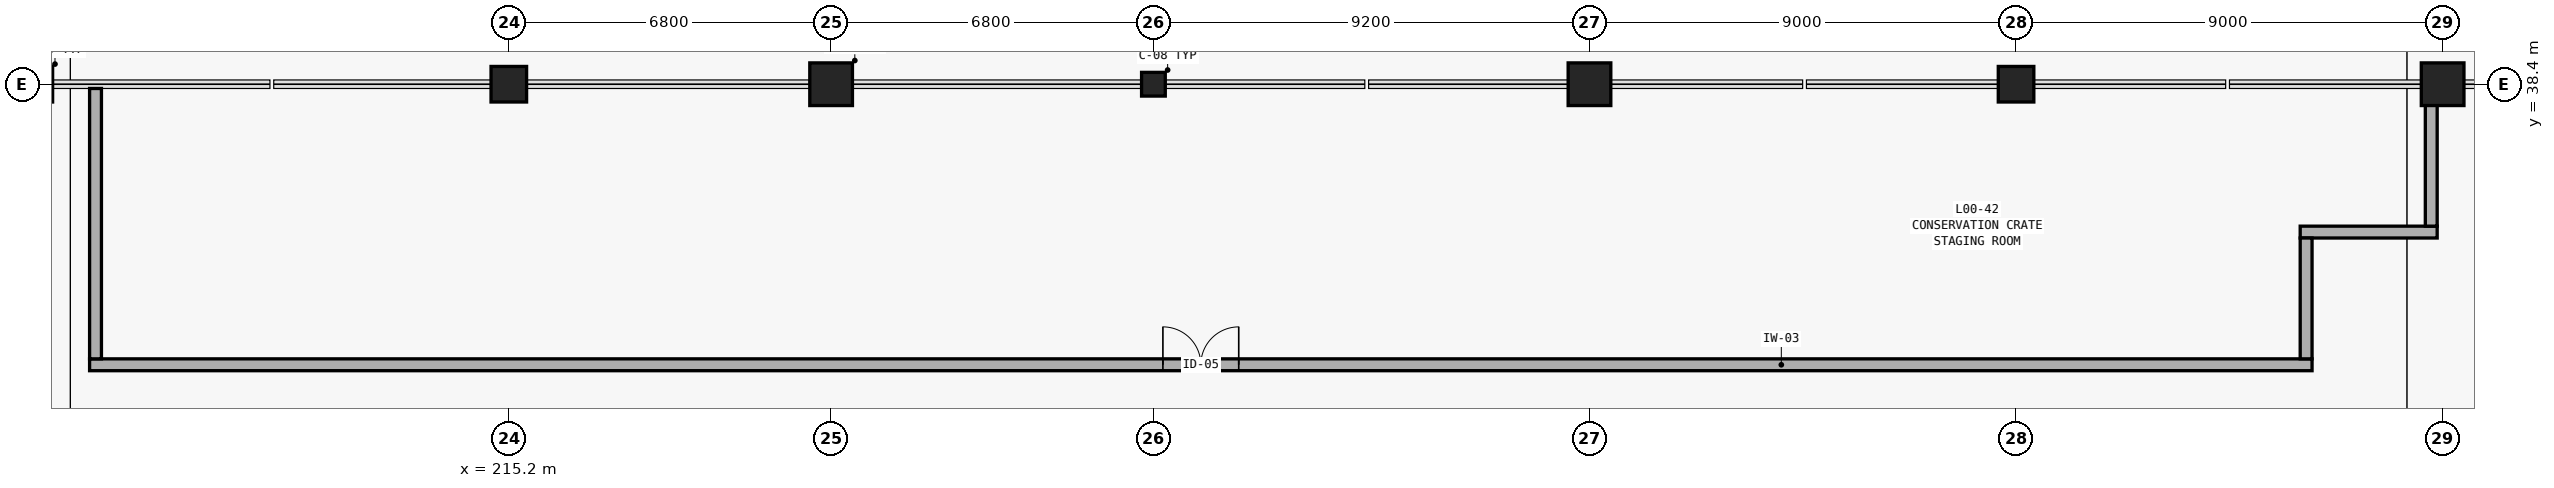
"""IFC4 building model, lengths in metres.
Left out: names, types, materials, properties, quantities, classifications, styles, units other than length and angle.
Written with IfcOpenShell. Run it as: python <this file> out.ifc"""

import sys

from ifc_helpers import new_model, si_unit, direction, frame, frame_2d, origin, origin_2d, place, context, subcontext, project, spatial, rectangle, extrude, element, fill, save


model = new_model("IFC4")
c1 = context("Model", 3, precision=1e-05, world=origin(), true_north=direction((0.0, 1.0)))
c2 = subcontext(c1, "Body", "Model", "MODEL_VIEW")
j1 = project(units=[si_unit("LENGTHUNIT", "METRE"), si_unit("PLANEANGLEUNIT", "RADIAN")], contexts=[c1])
p1 = place(None, origin())
s1 = spatial("IfcSite", under=j1, at=p1, CompositionType="ELEMENT")
p2 = place(p1, origin())
s2 = spatial("IfcBuilding", under=s1, at=p2, CompositionType="ELEMENT")
p3 = place(p2, origin())
s3 = spatial("IfcBuildingStorey", under=s2, at=p3, CompositionType="ELEMENT", Elevation=0.0)
for number, where, z_axis, x_axis in (
    (1, (205.2, 38.4, 0.0), (0.0, 0.0, 1.0), (1.0, 0.0, 0.0)),
    (2, (215.2, 38.4, 0.0), (0.0, 0.0, 1.0), (1.0, 0.0, 0.0)),
):
    element("IfcColumn", number, at=place(p3, frame(where, z_axis=z_axis, x_axis=x_axis)), inside=s3, PredefinedType="COLUMN", context=c2, shape_type="SweptSolid", body=[
        extrude(rectangle(XDim=0.75, YDim=0.75, at=origin_2d()), origin(), (0.0, 0.0, 1.0), 4.8),
    ])
p4 = place(p3, frame((222.0, 38.4, 0.0), z_axis=(0.0, 0.0, 1.0), x_axis=(1.0, 0.0, 0.0)))
e3 = element("IfcColumn", 3, at=p4, inside=s3, PredefinedType="COLUMN", context=c2, shape_type="SweptSolid", body=[
    extrude(rectangle(XDim=0.9, YDim=0.9, at=origin_2d()), origin(), (0.0, 0.0, 1.0), 4.8),
])
p5 = place(p3, frame((228.8, 38.4, 0.0), z_axis=(0.0, 0.0, 1.0), x_axis=(1.0, 0.0, 0.0)))
e4 = element("IfcColumn", 4, at=p5, inside=s3, PredefinedType="COLUMN", context=c2, shape_type="SweptSolid", body=[
    extrude(rectangle(XDim=0.5, YDim=0.5, at=origin_2d()), origin(), (0.0, 0.0, 1.0), 4.8),
])
p6 = place(p3, frame((238.0, 38.4, 0.0), z_axis=(0.0, 0.0, 1.0), x_axis=(1.0, 0.0, 0.0)))
e5 = element("IfcColumn", 5, at=p6, inside=s3, PredefinedType="COLUMN", context=c2, shape_type="SweptSolid", body=[
    extrude(rectangle(XDim=0.9, YDim=0.9, at=origin_2d()), origin(), (0.0, 0.0, 1.0), 4.8),
])
p7 = place(p3, frame((247.0, 38.4, 0.0), z_axis=(0.0, 0.0, 1.0), x_axis=(1.0, 0.0, 0.0)))
e6 = element("IfcColumn", 6, at=p7, inside=s3, PredefinedType="COLUMN", context=c2, shape_type="SweptSolid", body=[
    extrude(rectangle(XDim=0.75, YDim=0.75, at=origin_2d()), origin(), (0.0, 0.0, 1.0), 4.8),
])
p8 = place(p3, frame((256.0, 38.4, 0.0), z_axis=(0.0, 0.0, 1.0), x_axis=(1.0, 0.0, 0.0)))
e7 = element("IfcColumn", 7, at=p8, inside=s3, PredefinedType="COLUMN", context=c2, shape_type="SweptSolid", body=[
    extrude(rectangle(XDim=0.9, YDim=0.9, at=origin_2d()), origin(), (0.0, 0.0, 1.0), 4.8),
])
p9 = place(p3, frame((206.355, 32.48, 0.0), z_axis=(0.0, 0.0, 1.0), x_axis=(1.0, 0.0, 0.0)))
e8 = element("IfcWall", 8, at=p9, inside=s3, PredefinedType="PARTITIONING", context=c2, shape_type="SweptSolid", body=[
    extrude(rectangle(XDim=46.89, YDim=0.25, at=frame_2d((23.445, 0.0))), origin(), (0.0, 0.0, 1.0), 3.38),
])
p10 = place(p9, frame((22.645, 0.0, 0.0)))
e9 = element("IfcOpeningElement", 9, at=p10, cuts=e8, PredefinedType="OPENING", context=c2, shape_type="SweptSolid", body=[
    extrude(rectangle(XDim=1.6, YDim=2.3, at=frame_2d((0.8, 1.15))), frame((0.0, 0.14, 0.0), z_axis=(0.0, -1.0, 0.0), x_axis=(1.0, 0.0, 0.0)), (0.0, 0.0, 1.0), 0.28),
])
p11 = place(p3, frame((252.995, 35.28, 0.0), z_axis=(0.0, 0.0, 1.0), x_axis=(1.0, 0.0, 0.0)))
e10 = element("IfcWall", 10, at=p11, inside=s3, PredefinedType="PARTITIONING", context=c2, shape_type="SweptSolid", body=[
    extrude(rectangle(XDim=2.89, YDim=0.25, at=frame_2d((1.445, 0.0))), origin(), (0.0, 0.0, 1.0), 3.38),
])
p12 = place(p3, frame((206.48, 32.605, 0.0), z_axis=(0.0, 0.0, 1.0), x_axis=(0.0, 1.0, 0.0)))
e11 = element("IfcWall", 11, at=p12, inside=s3, PredefinedType="PARTITIONING", context=c2, shape_type="SweptSolid", body=[
    extrude(rectangle(XDim=5.705, YDim=0.25, at=frame_2d((2.853, 0.0))), origin(), (0.0, 0.0, 1.0), 3.38),
])
p13 = place(p3, frame((253.12, 32.605, 0.0), z_axis=(0.0, 0.0, 1.0), x_axis=(0.0, 1.0, 0.0)))
e12 = element("IfcWall", 12, at=p13, inside=s3, PredefinedType="PARTITIONING", context=c2, shape_type="SweptSolid", body=[
    extrude(rectangle(XDim=2.55, YDim=0.25, at=frame_2d((1.275, 0.0))), origin(), (0.0, 0.0, 1.0), 3.38),
])
p14 = place(p3, frame((255.76, 35.405, 0.0), z_axis=(0.0, 0.0, 1.0), x_axis=(0.0, 1.0, 0.0)))
e13 = element("IfcWall", 13, at=p14, inside=s3, PredefinedType="PARTITIONING", context=c2, shape_type="SweptSolid", body=[
    extrude(rectangle(XDim=2.905, YDim=0.25, at=frame_2d((1.453, 0.0))), origin(), (0.0, 0.0, 1.0), 3.38),
])
p15 = place(p10, origin())
e14 = element("IfcDoor", 14, at=p15, inside=s3, OperationType="DOUBLE_DOOR_SINGLE_SWING", PredefinedType="DOOR", context=c2, shape_type="SweptSolid", body=[
    extrude(rectangle(XDim=1.6, YDim=2.3, at=frame_2d((0.8, 1.15))), frame((0.0, 0.025, 0.0), z_axis=(0.0, -1.0, 0.0), x_axis=(1.0, 0.0, 0.0)), (0.0, 0.0, 1.0), 0.05),
])
fill(e9, e14)
save(model, sys.argv[1])
